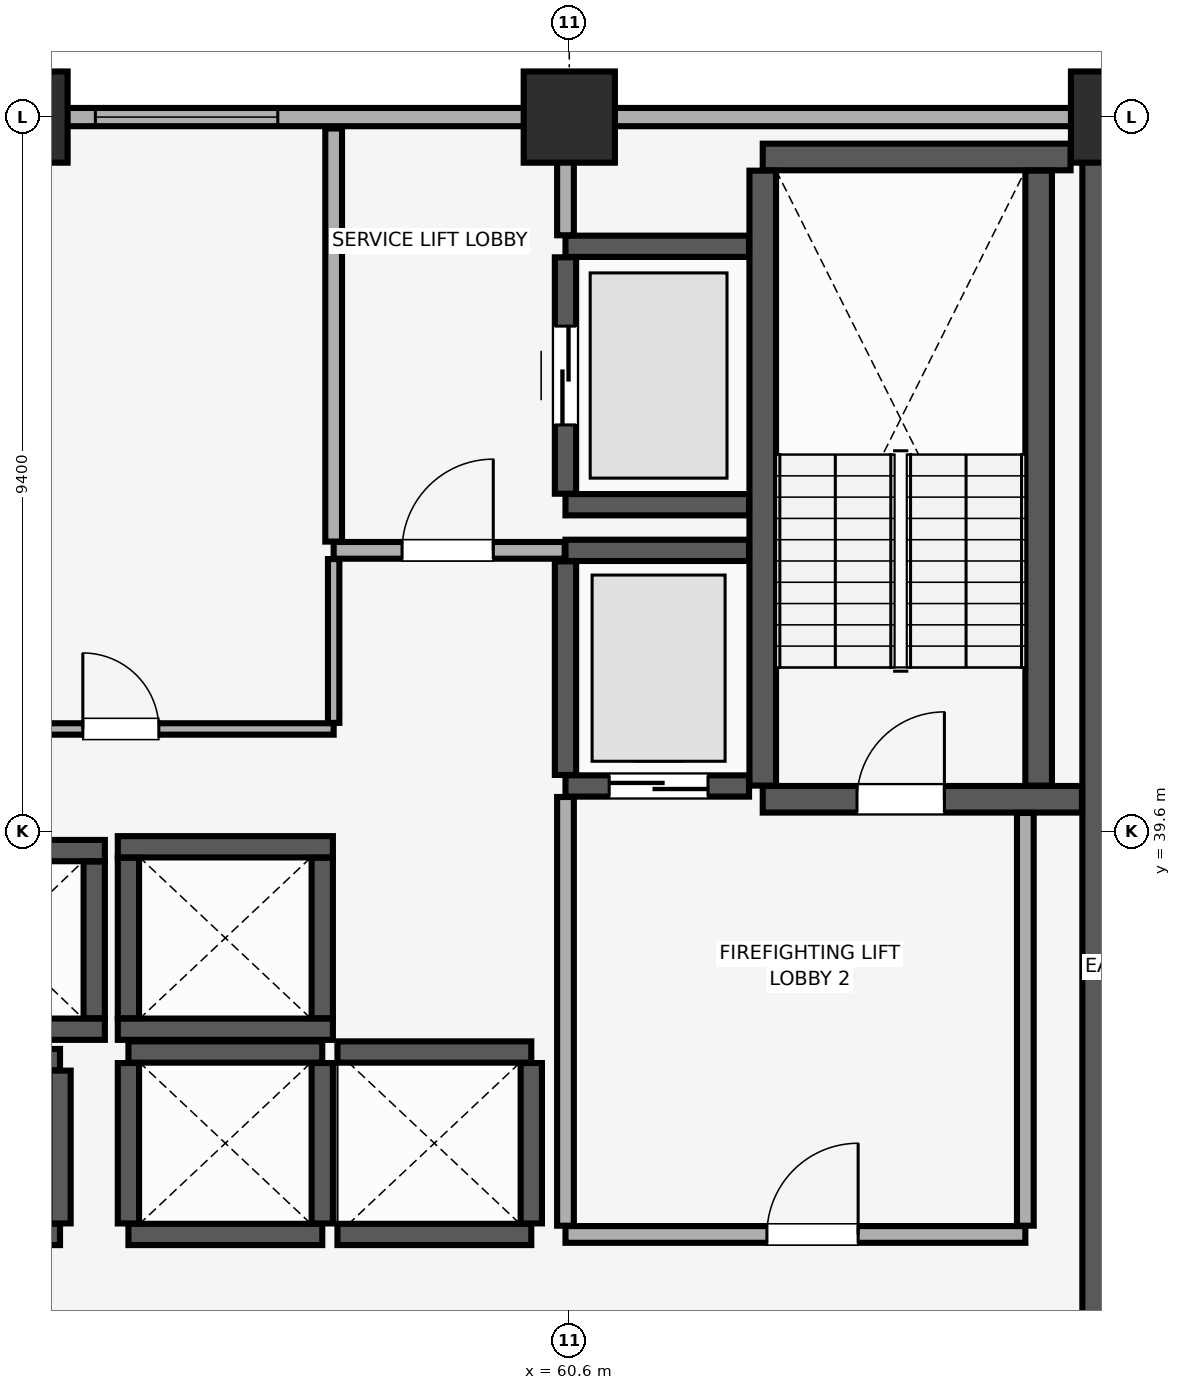
"""IFC4 building model, lengths in metres.
Left out: names, types, materials, properties, quantities, classifications, styles, units other than length and angle.
Written with IfcOpenShell. Run it as: python <this file> out.ifc"""

import sys

from ifc_helpers import new_model, si_unit, direction, frame, frame_2d, origin, origin_2d, place, context, subcontext, project, spatial, rectangle, extrude, element, fill, save


model = new_model("IFC4")
c1 = context("Model", 3, precision=1e-05, world=origin(), true_north=direction((0.0, 1.0)))
c2 = subcontext(c1, "Body", "Model", "MODEL_VIEW")
j1 = project(units=[si_unit("LENGTHUNIT", "METRE"), si_unit("PLANEANGLEUNIT", "RADIAN")], contexts=[c1])
p1 = place(None, origin())
s1 = spatial("IfcSite", under=j1, at=p1, CompositionType="ELEMENT")
p2 = place(p1, origin())
s2 = spatial("IfcBuilding", under=s1, at=p2, CompositionType="ELEMENT")
p3 = place(p2, frame((0.0, 0.0, 220.55)))
s3 = spatial("IfcBuildingStorey", under=s2, at=p3, CompositionType="ELEMENT", Elevation=220.55)
for number, where, z_axis, x_axis in (
    (1, (53.4, 49.0, 0.0), (0.0, 0.0, 1.0), (1.0, 0.0, 0.0)),
    (2, (60.6, 49.0, 0.0), (0.0, 0.0, 1.0), (1.0, 0.0, 0.0)),
    (3, (67.8, 49.0, 0.0), (0.0, 0.0, 1.0), (1.0, 0.0, 0.0)),
):
    element("IfcColumn", number, at=place(p3, frame(where, z_axis=z_axis, x_axis=x_axis)), inside=s3, PredefinedType="COLUMN", context=c2, shape_type="SweptSolid", body=[
        extrude(rectangle(XDim=1.2, YDim=1.2, at=origin_2d()), origin(), (0.0, 0.0, 1.0), 3.56),
    ])
p4 = place(p3, frame((77.0, 49.0, 0.0), z_axis=(0.0, 0.0, 1.0), x_axis=(-1.0, 0.0, 0.0)))
e4 = element("IfcWall", 4, at=p4, inside=s3, PredefinedType="SOLIDWALL", context=c2, shape_type="SweptSolid", body=[
    extrude(rectangle(XDim=70.0, YDim=0.24, at=frame_2d((35.0, 0.0))), origin(), (0.0, 0.0, 1.0), 2.76),
])
p5 = place(p4, frame((63.7, 0.0, 0.85)))
e5 = element("IfcOpeningElement", 5, at=p5, cuts=e4, PredefinedType="OPENING", context=c2, shape_type="SweptSolid", body=[
    extrude(rectangle(XDim=3.0, YDim=1.5, at=frame_2d((1.5, 0.75))), frame((0.0, 0.13, 0.0), z_axis=(0.0, -1.0, 0.0), x_axis=(1.0, 0.0, 0.0)), (0.0, 0.0, 1.0), 0.26),
])
p6 = place(p4, frame((3.3, 0.0, 0.85)))
e6 = element("IfcOpeningElement", 6, at=p6, cuts=e4, PredefinedType="OPENING", context=c2, shape_type="SweptSolid", body=[
    extrude(rectangle(XDim=3.0, YDim=1.5, at=frame_2d((1.5, 0.75))), frame((0.0, 0.13, 0.0), z_axis=(0.0, -1.0, 0.0), x_axis=(1.0, 0.0, 0.0)), (0.0, 0.0, 1.0), 0.26),
])
p7 = place(p4, frame((49.465, 0.0, 0.9)))
e7 = element("IfcOpeningElement", 7, at=p7, cuts=e4, PredefinedType="OPENING", context=c2, shape_type="SweptSolid", body=[
    extrude(rectangle(XDim=1.5, YDim=1.4, at=frame_2d((0.75, 0.7))), frame((0.0, 0.13, 0.0), z_axis=(0.0, -1.0, 0.0), x_axis=(1.0, 0.0, 0.0)), (0.0, 0.0, 1.0), 0.26),
])
p8 = place(p4, frame((41.65, 0.0, 0.9)))
e8 = element("IfcOpeningElement", 8, at=p8, cuts=e4, PredefinedType="OPENING", context=c2, shape_type="SweptSolid", body=[
    extrude(rectangle(XDim=3.6, YDim=1.5, at=frame_2d((1.8, 0.75))), frame((0.0, 0.13, 0.0), z_axis=(0.0, -1.0, 0.0), x_axis=(1.0, 0.0, 0.0)), (0.0, 0.0, 1.0), 0.26),
])
p9 = place(p4, frame((28.25, 0.0, 0.9)))
e9 = element("IfcOpeningElement", 9, at=p9, cuts=e4, PredefinedType="OPENING", context=c2, shape_type="SweptSolid", body=[
    extrude(rectangle(XDim=1.5, YDim=1.4, at=frame_2d((0.75, 0.7))), frame((0.0, 0.13, 0.0), z_axis=(0.0, -1.0, 0.0), x_axis=(1.0, 0.0, 0.0)), (0.0, 0.0, 1.0), 0.26),
])
p10 = place(p4, frame((24.6, 0.0, 0.9)))
e10 = element("IfcOpeningElement", 10, at=p10, cuts=e4, PredefinedType="OPENING", context=c2, shape_type="SweptSolid", body=[
    extrude(rectangle(XDim=2.4, YDim=1.5, at=frame_2d((1.2, 0.75))), frame((0.0, 0.13, 0.0), z_axis=(0.0, -1.0, 0.0), x_axis=(1.0, 0.0, 0.0)), (0.0, 0.0, 1.0), 0.26),
])
p11 = place(p4, frame((20.235, 0.0, 0.9)))
e11 = element("IfcOpeningElement", 11, at=p11, cuts=e4, PredefinedType="OPENING", context=c2, shape_type="SweptSolid", body=[
    extrude(rectangle(XDim=2.4, YDim=1.5, at=frame_2d((1.2, 0.75))), frame((0.0, 0.13, 0.0), z_axis=(0.0, -1.0, 0.0), x_axis=(1.0, 0.0, 0.0)), (0.0, 0.0, 1.0), 0.26),
])
p12 = place(p3, frame((67.8, 29.4, 0.0), z_axis=(0.0, 0.0, 1.0), x_axis=(0.0, 1.0, 0.0)))
e12 = element("IfcWall", 12, at=p12, inside=s3, PredefinedType="SHEAR", context=c2, shape_type="SweptSolid", body=[
    extrude(rectangle(XDim=19.2, YDim=0.9, at=frame_2d((9.6, 0.0))), origin(), (0.0, 0.0, 1.0), 3.56),
])
p13 = place(p3, frame((63.145, 40.025, 0.0), z_axis=(0.0, 0.0, 1.0), x_axis=(1.0, 0.0, 0.0)))
e13 = element("IfcWall", 13, at=p13, inside=s3, PredefinedType="SHEAR", context=c2, shape_type="SweptSolid", body=[
    extrude(rectangle(XDim=4.2, YDim=0.35, at=frame_2d((2.1, 0.0))), origin(), (0.0, 0.0, 1.0), 3.56),
])
p14 = place(p13, frame((1.24, 0.0, 0.0)))
e14 = element("IfcOpeningElement", 14, at=p14, cuts=e13, PredefinedType="OPENING", context=c2, shape_type="SweptSolid", body=[
    extrude(rectangle(XDim=1.15, YDim=2.15, at=frame_2d((0.575, 1.075))), frame((0.0, 0.185, 0.0), z_axis=(0.0, -1.0, 0.0), x_axis=(1.0, 0.0, 0.0)), (0.0, 0.0, 1.0), 0.37),
])
p15 = place(p3, frame((63.145, 48.475, 0.0), z_axis=(0.0, 0.0, 1.0), x_axis=(1.0, 0.0, 0.0)))
e15 = element("IfcWall", 15, at=p15, inside=s3, PredefinedType="SHEAR", context=c2, shape_type="SweptSolid", body=[
    extrude(rectangle(XDim=4.05, YDim=0.35, at=frame_2d((2.025, 0.0))), origin(), (0.0, 0.0, 1.0), 3.56),
])
for number, where, z_axis, x_axis in (
    (16, (63.145, 40.205, 0.0), (0.0, 0.0, 1.0), (0.0, 1.0, 0.0)),
    (17, (66.775, 40.205, 0.0), (0.0, 0.0, 1.0), (0.0, 1.0, 0.0)),
):
    element("IfcWall", number, at=place(p3, frame(where, z_axis=z_axis, x_axis=x_axis)), inside=s3, PredefinedType="SHEAR", context=c2, shape_type="SweptSolid", body=[
        extrude(rectangle(XDim=8.09, YDim=0.35, at=frame_2d((4.045, 0.0))), origin(), (0.0, 0.0, 1.0), 3.56),
    ])
p16 = place(p3, frame((51.6, 34.3, 0.0), z_axis=(0.0, 0.0, 1.0), x_axis=(1.0, 0.0, 0.0)))
e18 = element("IfcWall", 18, at=p16, inside=s3, PredefinedType="SHEAR", context=c2, shape_type="SweptSolid", body=[
    extrude(rectangle(XDim=2.3, YDim=0.28, at=frame_2d((1.15, 0.0))), origin(), (0.0, 0.0, 1.0), 3.56),
])
p17 = place(p16, frame((0.6, 0.0, 0.0)))
e19 = element("IfcOpeningElement", 19, at=p17, cuts=e18, PredefinedType="OPENING", context=c2, shape_type="SweptSolid", body=[
    extrude(rectangle(XDim=1.1, YDim=2.2, at=frame_2d((0.55, 1.1))), frame((0.0, 0.15, 0.0), z_axis=(0.0, -1.0, 0.0), x_axis=(1.0, 0.0, 0.0)), (0.0, 0.0, 1.0), 0.3),
])
p18 = place(p3, frame((51.6, 36.6, 0.0), z_axis=(0.0, 0.0, 1.0), x_axis=(1.0, 0.0, 0.0)))
e20 = element("IfcWall", 20, at=p18, inside=s3, PredefinedType="SHEAR", context=c2, shape_type="SweptSolid", body=[
    extrude(rectangle(XDim=2.3, YDim=0.28, at=frame_2d((1.15, 0.0))), origin(), (0.0, 0.0, 1.0), 3.56),
])
p19 = place(p3, frame((53.9, 34.445, 0.0), z_axis=(0.0, 0.0, 1.0), x_axis=(0.0, 1.0, 0.0)))
e21 = element("IfcWall", 21, at=p19, inside=s3, PredefinedType="SHEAR", context=c2, shape_type="SweptSolid", body=[
    extrude(rectangle(XDim=2.01, YDim=0.28, at=frame_2d((1.005, 0.0))), origin(), (0.0, 0.0, 1.0), 3.56),
])
for number, where, z_axis, x_axis in (
    (22, (51.9, 37.0, 0.0), (0.0, 0.0, 1.0), (1.0, 0.0, 0.0)),
    (23, (51.9, 39.35, 0.0), (0.0, 0.0, 1.0), (1.0, 0.0, 0.0)),
):
    element("IfcWall", number, at=place(p3, frame(where, z_axis=z_axis, x_axis=x_axis)), inside=s3, PredefinedType="SHEAR", context=c2, shape_type="SweptSolid", body=[
        extrude(rectangle(XDim=2.59, YDim=0.28, at=frame_2d((1.295, 0.0))), origin(), (0.0, 0.0, 1.0), 3.56),
    ])
p20 = place(p3, frame((54.35, 37.145, 0.0), z_axis=(0.0, 0.0, 1.0), x_axis=(0.0, 1.0, 0.0)))
e24 = element("IfcWall", 24, at=p20, inside=s3, PredefinedType="SHEAR", context=c2, shape_type="SweptSolid", body=[
    extrude(rectangle(XDim=2.06, YDim=0.28, at=frame_2d((1.03, 0.0))), origin(), (0.0, 0.0, 1.0), 3.56),
])
for number, where, z_axis, x_axis in (
    (25, (54.8, 34.3, 0.0), (0.0, 0.0, 1.0), (1.0, 0.0, 0.0)),
    (26, (54.8, 36.7, 0.0), (0.0, 0.0, 1.0), (1.0, 0.0, 0.0)),
):
    element("IfcWall", number, at=place(p3, frame(where, z_axis=z_axis, x_axis=x_axis)), inside=s3, PredefinedType="SHEAR", context=c2, shape_type="SweptSolid", body=[
        extrude(rectangle(XDim=2.55, YDim=0.28, at=frame_2d((1.275, 0.0))), origin(), (0.0, 0.0, 1.0), 3.56),
    ])
for number, where, z_axis, x_axis in (
    (27, (54.8, 34.445, 0.0), (0.0, 0.0, 1.0), (0.0, 1.0, 0.0)),
    (28, (57.35, 34.445, 0.0), (0.0, 0.0, 1.0), (0.0, 1.0, 0.0)),
):
    element("IfcWall", number, at=place(p3, frame(where, z_axis=z_axis, x_axis=x_axis)), inside=s3, PredefinedType="SHEAR", context=c2, shape_type="SweptSolid", body=[
        extrude(rectangle(XDim=2.11, YDim=0.28, at=frame_2d((1.055, 0.0))), origin(), (0.0, 0.0, 1.0), 3.56),
    ])
for number, where, z_axis, x_axis in (
    (29, (57.55, 34.3, 0.0), (0.0, 0.0, 1.0), (1.0, 0.0, 0.0)),
    (30, (57.55, 36.7, 0.0), (0.0, 0.0, 1.0), (1.0, 0.0, 0.0)),
):
    element("IfcWall", number, at=place(p3, frame(where, z_axis=z_axis, x_axis=x_axis)), inside=s3, PredefinedType="SHEAR", context=c2, shape_type="SweptSolid", body=[
        extrude(rectangle(XDim=2.55, YDim=0.28, at=frame_2d((1.275, 0.0))), origin(), (0.0, 0.0, 1.0), 3.56),
    ])
p21 = place(p3, frame((60.1, 34.445, 0.0), z_axis=(0.0, 0.0, 1.0), x_axis=(0.0, 1.0, 0.0)))
e31 = element("IfcWall", 31, at=p21, inside=s3, PredefinedType="SHEAR", context=c2, shape_type="SweptSolid", body=[
    extrude(rectangle(XDim=2.11, YDim=0.28, at=frame_2d((1.055, 0.0))), origin(), (0.0, 0.0, 1.0), 3.56),
])
for number, where, z_axis, x_axis in (
    (32, (54.66, 37.0, 0.0), (0.0, 0.0, 1.0), (1.0, 0.0, 0.0)),
    (33, (54.66, 39.4, 0.0), (0.0, 0.0, 1.0), (1.0, 0.0, 0.0)),
):
    element("IfcWall", number, at=place(p3, frame(where, z_axis=z_axis, x_axis=x_axis)), inside=s3, PredefinedType="SHEAR", context=c2, shape_type="SweptSolid", body=[
        extrude(rectangle(XDim=2.83, YDim=0.28, at=frame_2d((1.415, 0.0))), origin(), (0.0, 0.0, 1.0), 3.56),
    ])
for number, where, z_axis, x_axis in (
    (34, (54.8, 37.145, 0.0), (0.0, 0.0, 1.0), (0.0, 1.0, 0.0)),
    (35, (57.35, 37.145, 0.0), (0.0, 0.0, 1.0), (0.0, 1.0, 0.0)),
):
    element("IfcWall", number, at=place(p3, frame(where, z_axis=z_axis, x_axis=x_axis)), inside=s3, PredefinedType="SHEAR", context=c2, shape_type="SweptSolid", body=[
        extrude(rectangle(XDim=2.11, YDim=0.28, at=frame_2d((1.055, 0.0))), origin(), (0.0, 0.0, 1.0), 3.56),
    ])
p22 = place(p3, frame((60.55, 40.2, 0.0), z_axis=(0.0, 0.0, 1.0), x_axis=(1.0, 0.0, 0.0)))
e36 = element("IfcWall", 36, at=p22, inside=s3, PredefinedType="SHEAR", context=c2, shape_type="SweptSolid", body=[
    extrude(rectangle(XDim=2.415, YDim=0.28, at=frame_2d((1.208, 0.0))), origin(), (0.0, 0.0, 1.0), 3.56),
])
p23 = place(p22, frame((0.575, 0.0, 0.0)))
e37 = element("IfcOpeningElement", 37, at=p23, cuts=e36, PredefinedType="OPENING", context=c2, shape_type="SweptSolid", body=[
    extrude(rectangle(XDim=1.3, YDim=2.3, at=frame_2d((0.65, 1.15))), frame((0.0, 0.15, 0.0), z_axis=(0.0, -1.0, 0.0), x_axis=(1.0, 0.0, 0.0)), (0.0, 0.0, 1.0), 0.3),
])
p24 = place(p3, frame((60.55, 43.3, 0.0), z_axis=(0.0, 0.0, 1.0), x_axis=(1.0, 0.0, 0.0)))
e38 = element("IfcWall", 38, at=p24, inside=s3, PredefinedType="SHEAR", context=c2, shape_type="SweptSolid", body=[
    extrude(rectangle(XDim=2.415, YDim=0.28, at=frame_2d((1.208, 0.0))), origin(), (0.0, 0.0, 1.0), 3.56),
])
p25 = place(p3, frame((60.55, 40.345, 0.0), z_axis=(0.0, 0.0, 1.0), x_axis=(0.0, 1.0, 0.0)))
e39 = element("IfcWall", 39, at=p25, inside=s3, PredefinedType="SHEAR", context=c2, shape_type="SweptSolid", body=[
    extrude(rectangle(XDim=2.81, YDim=0.28, at=frame_2d((1.405, 0.0))), origin(), (0.0, 0.0, 1.0), 3.56),
])
for number, where, z_axis, x_axis in (
    (40, (60.55, 43.9, 0.0), (0.0, 0.0, 1.0), (1.0, 0.0, 0.0)),
    (41, (60.55, 47.3, 0.0), (0.0, 0.0, 1.0), (1.0, 0.0, 0.0)),
):
    element("IfcWall", number, at=place(p3, frame(where, z_axis=z_axis, x_axis=x_axis)), inside=s3, PredefinedType="SHEAR", context=c2, shape_type="SweptSolid", body=[
        extrude(rectangle(XDim=2.415, YDim=0.28, at=frame_2d((1.208, 0.0))), origin(), (0.0, 0.0, 1.0), 3.56),
    ])
p26 = place(p3, frame((60.55, 44.045, 0.0), z_axis=(0.0, 0.0, 1.0), x_axis=(0.0, 1.0, 0.0)))
e42 = element("IfcWall", 42, at=p26, inside=s3, PredefinedType="SHEAR", context=c2, shape_type="SweptSolid", body=[
    extrude(rectangle(XDim=3.11, YDim=0.28, at=frame_2d((1.555, 0.0))), origin(), (0.0, 0.0, 1.0), 3.56),
])
p27 = place(p26, frame((0.905, 0.0, 0.0)))
e43 = element("IfcOpeningElement", 43, at=p27, cuts=e42, PredefinedType="OPENING", context=c2, shape_type="SweptSolid", body=[
    extrude(rectangle(XDim=1.3, YDim=2.3, at=frame_2d((0.65, 1.15))), frame((0.0, 0.15, 0.0), z_axis=(0.0, -1.0, 0.0), x_axis=(1.0, 0.0, 0.0)), (0.0, 0.0, 1.0), 0.3),
])
p28 = place(p3, frame((60.55, 34.3, 0.0), z_axis=(0.0, 0.0, 1.0), x_axis=(1.0, 0.0, 0.0)))
e44 = element("IfcWall", 44, at=p28, inside=s3, PredefinedType="PARTITIONING", context=c2, shape_type="SweptSolid", body=[
    extrude(rectangle(XDim=6.05, YDim=0.22, at=frame_2d((3.025, 0.0))), origin(), (0.0, 0.0, 1.0), 3.56),
])
p29 = place(p28, frame((2.65, 0.0, 0.0)))
e45 = element("IfcOpeningElement", 45, at=p29, cuts=e44, PredefinedType="OPENING", context=c2, shape_type="SweptSolid", body=[
    extrude(rectangle(XDim=1.2, YDim=2.15, at=frame_2d((0.6, 1.075))), frame((0.0, 0.12, 0.0), z_axis=(0.0, -1.0, 0.0), x_axis=(1.0, 0.0, 0.0)), (0.0, 0.0, 1.0), 0.24),
])
p30 = place(p3, frame((60.55, 34.415, 0.0), z_axis=(0.0, 0.0, 1.0), x_axis=(0.0, 1.0, 0.0)))
e46 = element("IfcWall", 46, at=p30, inside=s3, PredefinedType="PARTITIONING", context=c2, shape_type="SweptSolid", body=[
    extrude(rectangle(XDim=5.64, YDim=0.22, at=frame_2d((2.82, 0.0))), origin(), (0.0, 0.0, 1.0), 3.56),
])
p31 = place(p3, frame((66.6, 34.415, 0.0), z_axis=(0.0, 0.0, 1.0), x_axis=(0.0, 1.0, 0.0)))
e47 = element("IfcWall", 47, at=p31, inside=s3, PredefinedType="PARTITIONING", context=c2, shape_type="SweptSolid", body=[
    extrude(rectangle(XDim=5.43, YDim=0.22, at=frame_2d((2.715, 0.0))), origin(), (0.0, 0.0, 1.0), 3.56),
])
p32 = place(p3, frame((57.5, 43.3, 0.0), z_axis=(0.0, 0.0, 1.0), x_axis=(1.0, 0.0, 0.0)))
e48 = element("IfcWall", 48, at=p32, inside=s3, PredefinedType="PARTITIONING", context=c2, shape_type="SweptSolid", body=[
    extrude(rectangle(XDim=3.04, YDim=0.22, at=frame_2d((1.52, 0.0))), origin(), (0.0, 0.0, 1.0), 3.56),
])
p33 = place(p32, frame((0.9, 0.0, 0.0)))
e49 = element("IfcOpeningElement", 49, at=p33, cuts=e48, PredefinedType="OPENING", context=c2, shape_type="SweptSolid", body=[
    extrude(rectangle(XDim=1.2, YDim=2.15, at=frame_2d((0.6, 1.075))), frame((0.0, 0.12, 0.0), z_axis=(0.0, -1.0, 0.0), x_axis=(1.0, 0.0, 0.0)), (0.0, 0.0, 1.0), 0.24),
])
p34 = place(p3, frame((57.5, 43.415, 0.0), z_axis=(0.0, 0.0, 1.0), x_axis=(0.0, 1.0, 0.0)))
e50 = element("IfcWall", 50, at=p34, inside=s3, PredefinedType="PARTITIONING", context=c2, shape_type="SweptSolid", body=[
    extrude(rectangle(XDim=5.435, YDim=0.22, at=frame_2d((2.718, 0.0))), origin(), (0.0, 0.0, 1.0), 3.56),
])
p35 = place(p3, frame((60.55, 47.445, 0.0), z_axis=(0.0, 0.0, 1.0), x_axis=(0.0, 1.0, 0.0)))
e51 = element("IfcWall", 51, at=p35, inside=s3, PredefinedType="PARTITIONING", context=c2, shape_type="SweptSolid", body=[
    extrude(rectangle(XDim=1.405, YDim=0.22, at=frame_2d((0.703, 0.0))), origin(), (0.0, 0.0, 1.0), 3.56),
])
p36 = place(p3, frame((49.48, 40.95, 0.0), z_axis=(0.0, 0.0, 1.0), x_axis=(1.0, 0.0, 0.0)))
e52 = element("IfcWall", 52, at=p36, inside=s3, PredefinedType="PARTITIONING", context=c2, shape_type="SweptSolid", body=[
    extrude(rectangle(XDim=8.02, YDim=0.15, at=frame_2d((4.01, 0.0))), origin(), (0.0, 0.0, 1.0), 3.56),
])
p37 = place(p36, frame((4.72, 0.0, 0.0)))
e53 = element("IfcOpeningElement", 53, at=p37, cuts=e52, PredefinedType="OPENING", context=c2, shape_type="SweptSolid", body=[
    extrude(rectangle(XDim=1.0, YDim=2.15, at=frame_2d((0.5, 1.075))), frame((0.0, 0.085, 0.0), z_axis=(0.0, -1.0, 0.0), x_axis=(1.0, 0.0, 0.0)), (0.0, 0.0, 1.0), 0.17),
])
p38 = place(p3, frame((57.5, 41.03, 0.0), z_axis=(0.0, 0.0, 1.0), x_axis=(0.0, 1.0, 0.0)))
e54 = element("IfcWall", 54, at=p38, inside=s3, PredefinedType="PARTITIONING", context=c2, shape_type="SweptSolid", body=[
    extrude(rectangle(XDim=2.155, YDim=0.15, at=frame_2d((1.078, 0.0))), origin(), (0.0, 0.0, 1.0), 3.56),
])
p39 = place(p11, origin())
e55 = element("IfcWindow", 55, at=p39, inside=s3, PartitioningType="SINGLE_PANEL", PredefinedType="WINDOW", context=c2, shape_type="SweptSolid", body=[
    extrude(rectangle(XDim=2.4, YDim=1.5, at=frame_2d((1.2, 0.75))), frame((0.0, 0.03, 0.0), z_axis=(0.0, -1.0, 0.0), x_axis=(1.0, 0.0, 0.0)), (0.0, 0.0, 1.0), 0.06),
])
fill(e11, e55)
p40 = place(p14, origin())
e56 = element("IfcDoor", 56, at=p40, inside=s3, OperationType="SINGLE_SWING_RIGHT", PredefinedType="DOOR", context=c2, shape_type="SweptSolid", body=[
    extrude(rectangle(XDim=1.15, YDim=2.15, at=frame_2d((0.575, 1.075))), frame((0.0, 0.025, 0.0), z_axis=(0.0, -1.0, 0.0), x_axis=(1.0, 0.0, 0.0)), (0.0, 0.0, 1.0), 0.05),
])
fill(e14, e56)
p41 = place(p23, origin())
e57 = element("IfcDoor", 57, at=p41, inside=s3, OperationType="DOUBLE_DOOR_SLIDING", PredefinedType="DOOR", context=c2, shape_type="SweptSolid", body=[
    extrude(rectangle(XDim=1.3, YDim=2.3, at=frame_2d((0.65, 1.15))), frame((0.0, 0.025, 0.0), z_axis=(0.0, -1.0, 0.0), x_axis=(1.0, 0.0, 0.0)), (0.0, 0.0, 1.0), 0.05),
])
fill(e37, e57)
p42 = place(p27, origin())
e58 = element("IfcDoor", 58, at=p42, inside=s3, OperationType="DOUBLE_DOOR_SLIDING", PredefinedType="DOOR", context=c2, shape_type="SweptSolid", body=[
    extrude(rectangle(XDim=1.3, YDim=2.3, at=frame_2d((0.65, 1.15))), frame((0.0, 0.025, 0.0), z_axis=(0.0, -1.0, 0.0), x_axis=(1.0, 0.0, 0.0)), (0.0, 0.0, 1.0), 0.05),
])
fill(e43, e58)
p43 = place(p29, origin())
e59 = element("IfcDoor", 59, at=p43, inside=s3, OperationType="SINGLE_SWING_RIGHT", PredefinedType="DOOR", context=c2, shape_type="SweptSolid", body=[
    extrude(rectangle(XDim=1.2, YDim=2.15, at=frame_2d((0.6, 1.075))), frame((0.0, 0.025, 0.0), z_axis=(0.0, -1.0, 0.0), x_axis=(1.0, 0.0, 0.0)), (0.0, 0.0, 1.0), 0.05),
])
fill(e45, e59)
p44 = place(p33, origin())
e60 = element("IfcDoor", 60, at=p44, inside=s3, OperationType="SINGLE_SWING_RIGHT", PredefinedType="DOOR", context=c2, shape_type="SweptSolid", body=[
    extrude(rectangle(XDim=1.2, YDim=2.15, at=frame_2d((0.6, 1.075))), frame((0.0, 0.025, 0.0), z_axis=(0.0, -1.0, 0.0), x_axis=(1.0, 0.0, 0.0)), (0.0, 0.0, 1.0), 0.05),
])
fill(e49, e60)
p45 = place(p37, origin())
e61 = element("IfcDoor", 61, at=p45, inside=s3, OperationType="SINGLE_SWING_LEFT", PredefinedType="DOOR", context=c2, shape_type="SweptSolid", body=[
    extrude(rectangle(XDim=1.0, YDim=2.15, at=frame_2d((0.5, 1.075))), frame((0.0, 0.025, 0.0), z_axis=(0.0, -1.0, 0.0), x_axis=(1.0, 0.0, 0.0)), (0.0, 0.0, 1.0), 0.05),
])
fill(e53, e61)
save(model, sys.argv[1])
